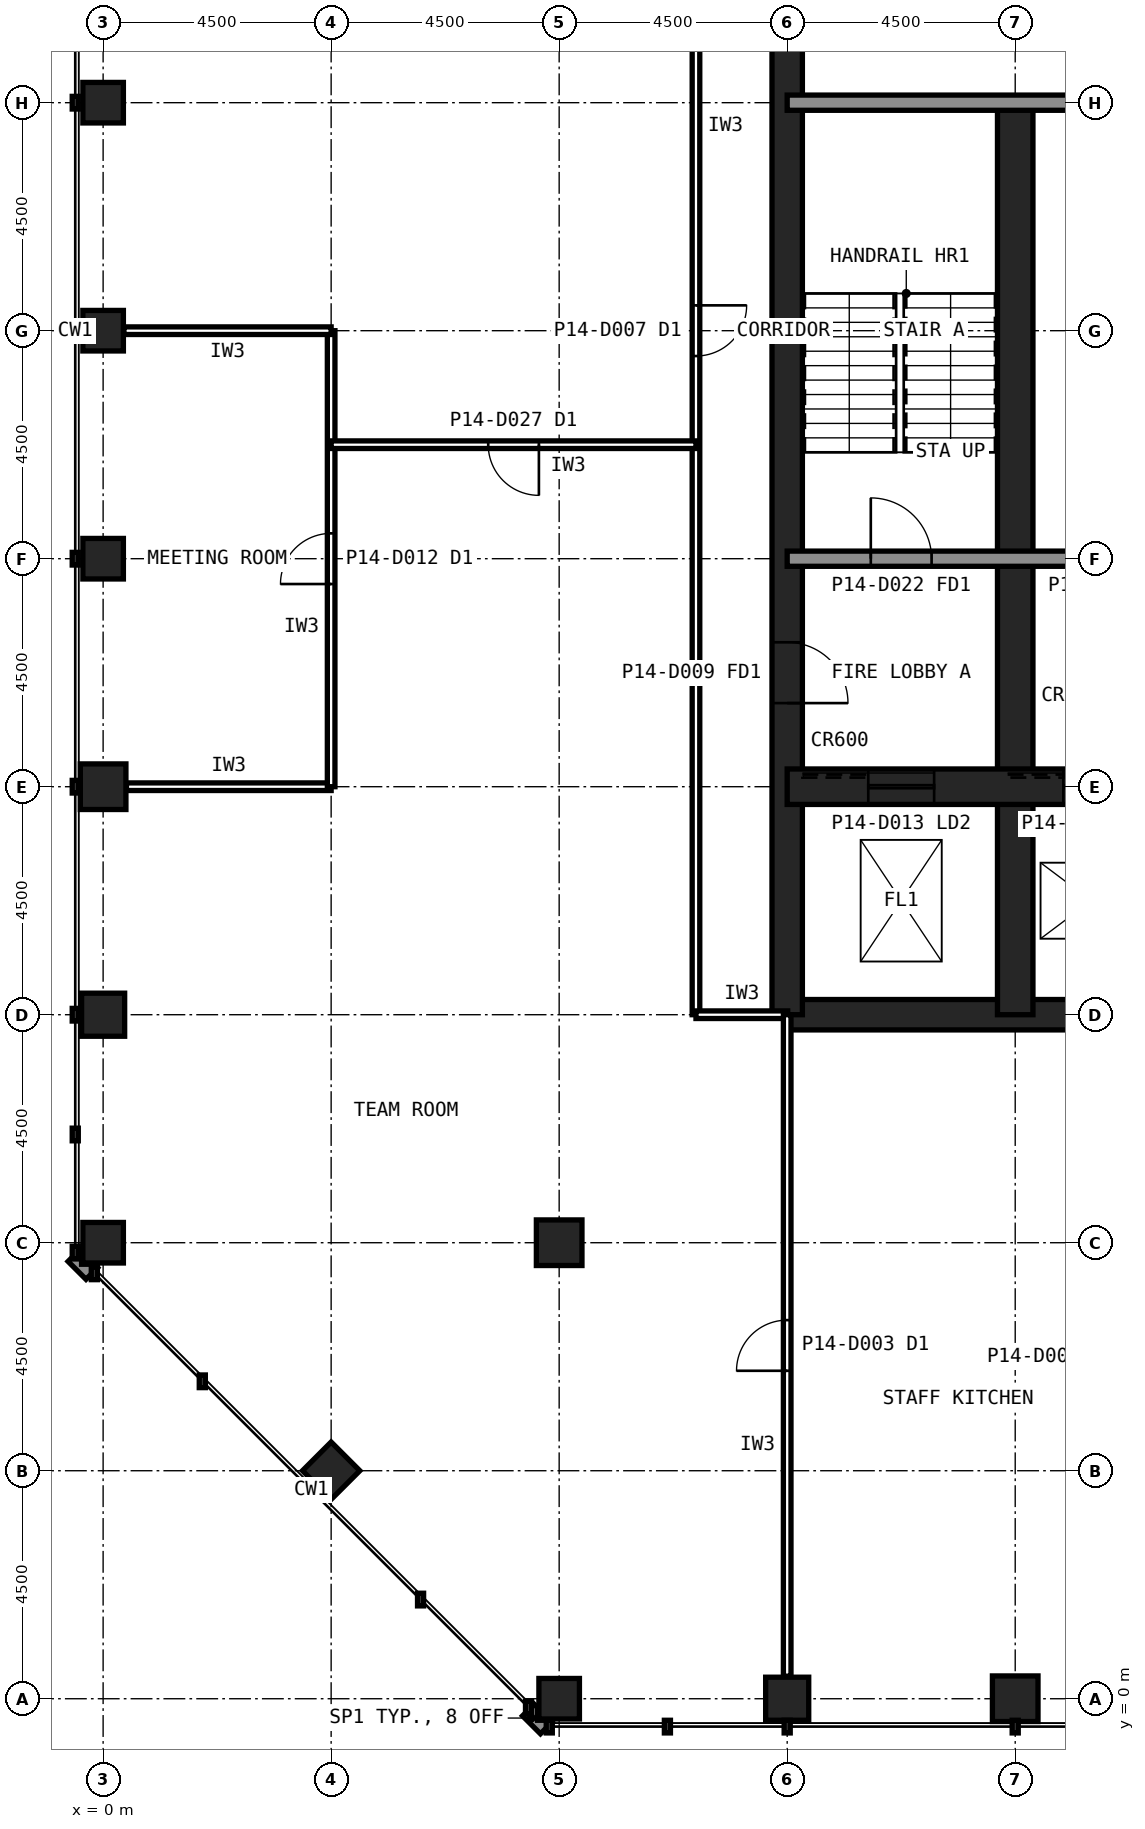
"""IFC4 building model, lengths in metres.
Left out: names, types, materials, properties, quantities, classifications, styles, units other than length and angle.
Written with IfcOpenShell. Run it as: python <this file> out.ifc"""

import sys

from ifc_helpers import new_model, si_unit, direction, frame, frame_2d, origin, origin_2d, place, context, subcontext, project, spatial, rectangle, hollow_rectangle, extrude, element, fill, save


model = new_model("IFC4")
c1 = context("Model", 3, precision=1e-05, world=origin(), true_north=direction((0.0, 1.0)))
c2 = subcontext(c1, "Body", "Model", "MODEL_VIEW")
j1 = project(units=[si_unit("LENGTHUNIT", "METRE"), si_unit("PLANEANGLEUNIT", "RADIAN")], contexts=[c1])
p1 = place(None, origin())
s1 = spatial("IfcSite", under=j1, at=p1, CompositionType="ELEMENT")
p2 = place(p1, origin())
s2 = spatial("IfcBuilding", under=s1, at=p2, CompositionType="ELEMENT")
p3 = place(p2, frame((0.0, 0.0, 62.6)))
s3 = spatial("IfcBuildingStorey", under=s2, at=p3, CompositionType="ELEMENT", Elevation=62.6)
p4 = place(p3, frame((9.0, 0.0, 0.0), z_axis=(0.0, 0.0, 1.0), x_axis=(1.0, 0.0, 0.0)))
e1 = element("IfcColumn", 1, at=p4, inside=s3, PredefinedType="COLUMN", context=c2, shape_type="SweptSolid", body=[
    extrude(hollow_rectangle(XDim=0.8, YDim=0.8, WallThickness=0.045, at=origin_2d()), origin(), (0.0, 0.0, 1.0), 4.2),
])
p5 = place(p3, frame((13.5, 0.0, 0.0), z_axis=(0.0, 0.0, 1.0), x_axis=(1.0, 0.0, 0.0)))
e2 = element("IfcColumn", 2, at=p5, inside=s3, PredefinedType="COLUMN", context=c2, shape_type="SweptSolid", body=[
    extrude(hollow_rectangle(XDim=0.85, YDim=0.85, WallThickness=0.05, at=origin_2d()), origin(), (0.0, 0.0, 1.0), 4.2),
])
p6 = place(p3, frame((18.0, 0.0, 0.0), z_axis=(0.0, 0.0, 1.0), x_axis=(1.0, 0.0, 0.0)))
e3 = element("IfcColumn", 3, at=p6, inside=s3, PredefinedType="COLUMN", context=c2, shape_type="SweptSolid", body=[
    extrude(hollow_rectangle(XDim=0.9, YDim=0.9, WallThickness=0.063, at=origin_2d()), origin(), (0.0, 0.0, 1.0), 4.2),
])
for number, where, z_axis, x_axis in (
    (4, (0.0, 31.5, 0.0), (0.0, 0.0, 1.0), (1.0, 0.0, 0.0)),
    (5, (0.0, 27.0, 0.0), (0.0, 0.0, 1.0), (1.0, 0.0, 0.0)),
    (6, (0.0, 22.5, 0.0), (0.0, 0.0, 1.0), (1.0, 0.0, 0.0)),
):
    element("IfcColumn", number, at=place(p3, frame(where, z_axis=z_axis, x_axis=x_axis)), inside=s3, PredefinedType="COLUMN", context=c2, shape_type="SweptSolid", body=[
        extrude(hollow_rectangle(XDim=0.8, YDim=0.8, WallThickness=0.045, at=origin_2d()), origin(), (0.0, 0.0, 1.0), 4.2),
    ])
p7 = place(p3, frame((0.0, 18.0, 0.0), z_axis=(0.0, 0.0, 1.0), x_axis=(1.0, 0.0, 0.0)))
e7 = element("IfcColumn", 7, at=p7, inside=s3, PredefinedType="COLUMN", context=c2, shape_type="SweptSolid", body=[
    extrude(hollow_rectangle(XDim=0.9, YDim=0.9, WallThickness=0.063, at=origin_2d()), origin(), (0.0, 0.0, 1.0), 4.2),
])
p8 = place(p3, frame((0.0, 13.5, 0.0), z_axis=(0.0, 0.0, 1.0), x_axis=(1.0, 0.0, 0.0)))
e8 = element("IfcColumn", 8, at=p8, inside=s3, PredefinedType="COLUMN", context=c2, shape_type="SweptSolid", body=[
    extrude(hollow_rectangle(XDim=0.85, YDim=0.85, WallThickness=0.05, at=origin_2d()), origin(), (0.0, 0.0, 1.0), 4.2),
])
for number, where, z_axis, x_axis in (
    (9, (0.0, 9.0, 0.0), (0.0, 0.0, 1.0), (1.0, 0.0, 0.0)),
    (10, (4.5, 4.5, 0.0), (0.0, 0.0, 1.0), (0.707, 0.707, 0.0)),
):
    element("IfcColumn", number, at=place(p3, frame(where, z_axis=z_axis, x_axis=x_axis)), inside=s3, PredefinedType="COLUMN", context=c2, shape_type="SweptSolid", body=[
        extrude(hollow_rectangle(XDim=0.8, YDim=0.8, WallThickness=0.045, at=origin_2d()), origin(), (0.0, 0.0, 1.0), 4.2),
    ])
p9 = place(p3, frame((9.0, 9.0, 0.0), z_axis=(0.0, 0.0, 1.0), x_axis=(1.0, 0.0, 0.0)))
e11 = element("IfcColumn", 11, at=p9, inside=s3, PredefinedType="COLUMN", context=c2, shape_type="SweptSolid", body=[
    extrude(hollow_rectangle(XDim=0.9, YDim=0.9, WallThickness=0.063, at=origin_2d()), origin(), (0.0, 0.0, 1.0), 4.2),
])
p10 = place(p3, frame((13.5, 13.5, 0.0), z_axis=(0.0, 0.0, 1.0), x_axis=(1.0, 0.0, 0.0)))
e12 = element("IfcWall", 12, at=p10, inside=s3, PredefinedType="SHEAR", context=c2, shape_type="SweptSolid", body=[
    extrude(rectangle(XDim=27.0, YDim=0.6, at=frame_2d((13.5, 0.0))), origin(), (0.0, 0.0, 1.0), 4.2),
])
p11 = place(p3, frame((13.5, 40.5, 0.0), z_axis=(0.0, 0.0, 1.0), x_axis=(0.0, -1.0, 0.0)))
e13 = element("IfcWall", 13, at=p11, inside=s3, PredefinedType="SHEAR", context=c2, shape_type="SweptSolid", body=[
    extrude(rectangle(XDim=27.0, YDim=0.6, at=frame_2d((13.5, 0.0))), origin(), (0.0, 0.0, 1.0), 4.2),
])
p12 = place(p11, frame((19.65, 0.0, 0.0)))
e14 = element("IfcOpeningElement", 14, at=p12, cuts=e13, PredefinedType="OPENING", context=c2, shape_type="SweptSolid", body=[
    extrude(rectangle(XDim=1.2, YDim=2.1, at=frame_2d((0.6, 1.05))), frame((0.0, 0.31, 0.0), z_axis=(0.0, -1.0, 0.0), x_axis=(1.0, 0.0, 0.0)), (0.0, 0.0, 1.0), 0.62),
])
p13 = place(p11, frame((5.85, 0.0, 0.0)))
e15 = element("IfcOpeningElement", 15, at=p13, cuts=e13, PredefinedType="OPENING", context=c2, shape_type="SweptSolid", body=[
    extrude(rectangle(XDim=1.8, YDim=2.1, at=frame_2d((0.9, 1.05))), frame((0.0, 0.31, 0.0), z_axis=(0.0, -1.0, 0.0), x_axis=(1.0, 0.0, 0.0)), (0.0, 0.0, 1.0), 0.62),
])
p14 = place(p3, frame((18.0, 13.5, 0.0), z_axis=(0.0, 0.0, 1.0), x_axis=(0.0, 1.0, 0.0)))
e16 = element("IfcWall", 16, at=p14, inside=s3, PredefinedType="SHEAR", context=c2, shape_type="SweptSolid", body=[
    extrude(rectangle(XDim=18.0, YDim=0.7, at=frame_2d((9.0, 0.0))), origin(), (0.0, 0.0, 1.0), 4.2),
])
p15 = place(p3, frame((13.5, 18.0, 0.0), z_axis=(0.0, 0.0, 1.0), x_axis=(1.0, 0.0, 0.0)))
e17 = element("IfcWall", 17, at=p15, inside=s3, PredefinedType="SHEAR", context=c2, shape_type="SweptSolid", body=[
    extrude(rectangle(XDim=27.0, YDim=0.7, at=frame_2d((13.5, 0.0))), origin(), (0.0, 0.0, 1.0), 4.2),
])
p16 = place(p15, frame((24.3, 0.0, 0.0)))
e18 = element("IfcOpeningElement", 18, at=p16, cuts=e17, PredefinedType="OPENING", context=c2, shape_type="SweptSolid", body=[
    extrude(rectangle(XDim=0.9, YDim=2.1, at=frame_2d((0.45, 1.05))), frame((0.0, 0.36, 0.0), z_axis=(0.0, -1.0, 0.0), x_axis=(1.0, 0.0, 0.0)), (0.0, 0.0, 1.0), 0.72),
])
p17 = place(p15, frame((5.45, 0.0, 0.0)))
e19 = element("IfcOpeningElement", 19, at=p17, cuts=e17, PredefinedType="OPENING", context=c2, shape_type="SweptSolid", body=[
    extrude(rectangle(XDim=1.1, YDim=2.1, at=frame_2d((0.55, 1.05))), frame((0.0, 0.36, 0.0), z_axis=(0.0, -1.0, 0.0), x_axis=(1.0, 0.0, 0.0)), (0.0, 0.0, 1.0), 0.72),
])
p18 = place(p15, frame((8.45, 0.0, 0.0)))
e20 = element("IfcOpeningElement", 20, at=p18, cuts=e17, PredefinedType="OPENING", context=c2, shape_type="SweptSolid", body=[
    extrude(rectangle(XDim=1.1, YDim=2.1, at=frame_2d((0.55, 1.05))), frame((0.0, 0.36, 0.0), z_axis=(0.0, -1.0, 0.0), x_axis=(1.0, 0.0, 0.0)), (0.0, 0.0, 1.0), 0.72),
])
p19 = place(p15, frame((11.45, 0.0, 0.0)))
e21 = element("IfcOpeningElement", 21, at=p19, cuts=e17, PredefinedType="OPENING", context=c2, shape_type="SweptSolid", body=[
    extrude(rectangle(XDim=1.1, YDim=2.1, at=frame_2d((0.55, 1.05))), frame((0.0, 0.36, 0.0), z_axis=(0.0, -1.0, 0.0), x_axis=(1.0, 0.0, 0.0)), (0.0, 0.0, 1.0), 0.72),
])
p20 = place(p15, frame((14.45, 0.0, 0.0)))
e22 = element("IfcOpeningElement", 22, at=p20, cuts=e17, PredefinedType="OPENING", context=c2, shape_type="SweptSolid", body=[
    extrude(rectangle(XDim=1.1, YDim=2.1, at=frame_2d((0.55, 1.05))), frame((0.0, 0.36, 0.0), z_axis=(0.0, -1.0, 0.0), x_axis=(1.0, 0.0, 0.0)), (0.0, 0.0, 1.0), 0.72),
])
p21 = place(p15, frame((17.45, 0.0, 0.0)))
e23 = element("IfcOpeningElement", 23, at=p21, cuts=e17, PredefinedType="OPENING", context=c2, shape_type="SweptSolid", body=[
    extrude(rectangle(XDim=1.1, YDim=2.1, at=frame_2d((0.55, 1.05))), frame((0.0, 0.36, 0.0), z_axis=(0.0, -1.0, 0.0), x_axis=(1.0, 0.0, 0.0)), (0.0, 0.0, 1.0), 0.72),
])
p22 = place(p15, frame((20.45, 0.0, 0.0)))
e24 = element("IfcOpeningElement", 24, at=p22, cuts=e17, PredefinedType="OPENING", context=c2, shape_type="SweptSolid", body=[
    extrude(rectangle(XDim=1.1, YDim=2.1, at=frame_2d((0.55, 1.05))), frame((0.0, 0.36, 0.0), z_axis=(0.0, -1.0, 0.0), x_axis=(1.0, 0.0, 0.0)), (0.0, 0.0, 1.0), 0.72),
])
p23 = place(p15, frame((1.6, 0.0, 0.0)))
e25 = element("IfcOpeningElement", 25, at=p23, cuts=e17, PredefinedType="OPENING", context=c2, shape_type="SweptSolid", body=[
    extrude(rectangle(XDim=1.3, YDim=2.2, at=frame_2d((0.65, 1.1))), frame((0.0, 0.36, 0.0), z_axis=(0.0, -1.0, 0.0), x_axis=(1.0, 0.0, 0.0)), (0.0, 0.0, 1.0), 0.72),
])
p24 = place(p3, frame((13.5, 22.5, 0.0), z_axis=(0.0, 0.0, 1.0), x_axis=(1.0, 0.0, 0.0)))
e26 = element("IfcWall", 26, at=p24, inside=s3, PredefinedType="SOLIDWALL", context=c2, shape_type="SweptSolid", body=[
    extrude(rectangle(XDim=27.0, YDim=0.3, at=frame_2d((13.5, 0.0))), origin(), (0.0, 0.0, 1.0), 4.04),
])
p25 = place(p24, frame((1.65, 0.0, 0.0)))
e27 = element("IfcOpeningElement", 27, at=p25, cuts=e26, PredefinedType="OPENING", context=c2, shape_type="SweptSolid", body=[
    extrude(rectangle(XDim=1.2, YDim=2.1, at=frame_2d((0.6, 1.05))), frame((0.0, 0.16, 0.0), z_axis=(0.0, -1.0, 0.0), x_axis=(1.0, 0.0, 0.0)), (0.0, 0.0, 1.0), 0.32),
])
p26 = place(p24, frame((6.025, 0.0, 0.0)))
e28 = element("IfcOpeningElement", 28, at=p26, cuts=e26, PredefinedType="OPENING", context=c2, shape_type="SweptSolid", body=[
    extrude(rectangle(XDim=1.0, YDim=2.1, at=frame_2d((0.5, 1.05))), frame((0.0, 0.16, 0.0), z_axis=(0.0, -1.0, 0.0), x_axis=(1.0, 0.0, 0.0)), (0.0, 0.0, 1.0), 0.32),
])
p27 = place(p24, frame((10.525, 0.0, 0.0)))
e29 = element("IfcOpeningElement", 29, at=p27, cuts=e26, PredefinedType="OPENING", context=c2, shape_type="SweptSolid", body=[
    extrude(rectangle(XDim=1.0, YDim=2.1, at=frame_2d((0.5, 1.05))), frame((0.0, 0.16, 0.0), z_axis=(0.0, -1.0, 0.0), x_axis=(1.0, 0.0, 0.0)), (0.0, 0.0, 1.0), 0.32),
])
p28 = place(p24, frame((19.75, 0.0, 0.0)))
e30 = element("IfcOpeningElement", 30, at=p28, cuts=e26, PredefinedType="OPENING", context=c2, shape_type="SweptSolid", body=[
    extrude(rectangle(XDim=1.0, YDim=2.1, at=frame_2d((0.5, 1.05))), frame((0.0, 0.16, 0.0), z_axis=(0.0, -1.0, 0.0), x_axis=(1.0, 0.0, 0.0)), (0.0, 0.0, 1.0), 0.32),
])
p29 = place(p24, frame((15.05, 0.0, 0.0)))
e31 = element("IfcOpeningElement", 31, at=p29, cuts=e26, PredefinedType="OPENING", context=c2, shape_type="SweptSolid", body=[
    extrude(rectangle(XDim=1.4, YDim=2.4, at=frame_2d((0.7, 1.2))), frame((0.0, 0.16, 0.0), z_axis=(0.0, -1.0, 0.0), x_axis=(1.0, 0.0, 0.0)), (0.0, 0.0, 1.0), 0.32),
])
p30 = place(p3, frame((13.5, 31.5, 0.0), z_axis=(0.0, 0.0, 1.0), x_axis=(1.0, 0.0, 0.0)))
e32 = element("IfcWall", 32, at=p30, inside=s3, PredefinedType="SOLIDWALL", context=c2, shape_type="SweptSolid", body=[
    extrude(rectangle(XDim=27.0, YDim=0.3, at=frame_2d((13.5, 0.0))), origin(), (0.0, 0.0, 1.0), 4.04),
])
p31 = place(p30, frame((24.15, 0.0, 0.0)))
e33 = element("IfcOpeningElement", 33, at=p31, cuts=e32, PredefinedType="OPENING", context=c2, shape_type="SweptSolid", body=[
    extrude(rectangle(XDim=1.2, YDim=2.1, at=frame_2d((0.6, 1.05))), frame((0.0, 0.16, 0.0), z_axis=(0.0, -1.0, 0.0), x_axis=(1.0, 0.0, 0.0)), (0.0, 0.0, 1.0), 0.32),
])
p32 = place(p30, frame((15.3, 0.0, 0.0)))
e34 = element("IfcOpeningElement", 34, at=p32, cuts=e32, PredefinedType="OPENING", context=c2, shape_type="SweptSolid", body=[
    extrude(rectangle(XDim=0.9, YDim=2.1, at=frame_2d((0.45, 1.05))), frame((0.0, 0.16, 0.0), z_axis=(0.0, -1.0, 0.0), x_axis=(1.0, 0.0, 0.0)), (0.0, 0.0, 1.0), 0.32),
])
p33 = place(p30, frame((19.8, 0.0, 0.0)))
e35 = element("IfcOpeningElement", 35, at=p33, cuts=e32, PredefinedType="OPENING", context=c2, shape_type="SweptSolid", body=[
    extrude(rectangle(XDim=0.9, YDim=2.1, at=frame_2d((0.45, 1.05))), frame((0.0, 0.16, 0.0), z_axis=(0.0, -1.0, 0.0), x_axis=(1.0, 0.0, 0.0)), (0.0, 0.0, 1.0), 0.32),
])
p34 = place(p3, frame((11.7, 40.5, 0.0), z_axis=(0.0, 0.0, 1.0), x_axis=(0.0, -1.0, 0.0)))
e36 = element("IfcWall", 36, at=p34, inside=s3, PredefinedType="PARTITIONING", context=c2, shape_type="SweptSolid", body=[
    extrude(rectangle(XDim=27.0, YDim=0.15, at=frame_2d((13.5, 0.0))), origin(), (0.0, 0.0, 1.0), 4.04),
])
p35 = place(p34, frame((13.0, 0.0, 0.0)))
e37 = element("IfcOpeningElement", 37, at=p35, cuts=e36, PredefinedType="OPENING", context=c2, shape_type="SweptSolid", body=[
    extrude(rectangle(XDim=1.0, YDim=2.1, at=frame_2d((0.5, 1.05))), frame((0.0, 0.085, 0.0), z_axis=(0.0, -1.0, 0.0), x_axis=(1.0, 0.0, 0.0)), (0.0, 0.0, 1.0), 0.17),
])
p36 = place(p3, frame((11.7, 13.5, 0.0), z_axis=(0.0, 0.0, 1.0), x_axis=(1.0, 0.0, 0.0)))
e38 = element("IfcWall", 38, at=p36, inside=s3, PredefinedType="PARTITIONING", context=c2, shape_type="SweptSolid", body=[
    extrude(rectangle(XDim=1.81, YDim=0.15, at=frame_2d((0.905, 0.0))), origin(), (0.0, 0.0, 1.0), 3.189),
])
p37 = place(p3, frame((0.46, 18.0, 0.0), z_axis=(0.0, 0.0, 1.0), x_axis=(1.0, 0.0, 0.0)))
e39 = element("IfcWall", 39, at=p37, inside=s3, PredefinedType="PARTITIONING", context=c2, shape_type="SweptSolid", body=[
    extrude(rectangle(XDim=4.04, YDim=0.15, at=frame_2d((2.02, 0.0))), origin(), (0.0, 0.0, 1.0), 3.189),
])
p38 = place(p3, frame((4.5, 18.0, 0.0), z_axis=(0.0, 0.0, 1.0), x_axis=(0.0, 1.0, 0.0)))
e40 = element("IfcWall", 40, at=p38, inside=s3, PredefinedType="PARTITIONING", context=c2, shape_type="SweptSolid", body=[
    extrude(rectangle(XDim=9.0, YDim=0.15, at=frame_2d((4.5, 0.0))), origin(), (0.0, 0.0, 1.0), 4.04),
])
p39 = place(p38, frame((4.0, 0.0, 0.0)))
e41 = element("IfcOpeningElement", 41, at=p39, cuts=e40, PredefinedType="OPENING", context=c2, shape_type="SweptSolid", body=[
    extrude(rectangle(XDim=1.0, YDim=2.1, at=frame_2d((0.5, 1.05))), frame((0.0, 0.085, 0.0), z_axis=(0.0, -1.0, 0.0), x_axis=(1.0, 0.0, 0.0)), (0.0, 0.0, 1.0), 0.17),
])
p40 = place(p3, frame((4.5, 27.0, 0.0), z_axis=(0.0, 0.0, 1.0), x_axis=(-1.0, 0.0, 0.0)))
e42 = element("IfcWall", 42, at=p40, inside=s3, PredefinedType="PARTITIONING", context=c2, shape_type="SweptSolid", body=[
    extrude(rectangle(XDim=4.09, YDim=0.15, at=frame_2d((2.045, 0.0))), origin(), (0.0, 0.0, 1.0), 3.189),
])
p41 = place(p3, frame((11.7, 24.75, 0.0), z_axis=(0.0, 0.0, 1.0), x_axis=(-1.0, 0.0, 0.0)))
e43 = element("IfcWall", 43, at=p41, inside=s3, PredefinedType="PARTITIONING", context=c2, shape_type="SweptSolid", body=[
    extrude(rectangle(XDim=7.2, YDim=0.15, at=frame_2d((3.6, 0.0))), origin(), (0.0, 0.0, 1.0), 4.04),
])
p42 = place(p41, frame((3.1, 0.0, 0.0)))
e44 = element("IfcOpeningElement", 44, at=p42, cuts=e43, PredefinedType="OPENING", context=c2, shape_type="SweptSolid", body=[
    extrude(rectangle(XDim=1.0, YDim=2.1, at=frame_2d((0.5, 1.05))), frame((0.0, 0.085, 0.0), z_axis=(0.0, -1.0, 0.0), x_axis=(1.0, 0.0, 0.0)), (0.0, 0.0, 1.0), 0.17),
])
p43 = place(p3, frame((13.5, 0.445, 0.0), z_axis=(0.0, 0.0, 1.0), x_axis=(0.0, 1.0, 0.0)))
e45 = element("IfcWall", 45, at=p43, inside=s3, PredefinedType="PARTITIONING", context=c2, shape_type="SweptSolid", body=[
    extrude(rectangle(XDim=13.055, YDim=0.15, at=frame_2d((6.527, 0.0))), origin(), (0.0, 0.0, 1.0), 3.189),
])
p44 = place(p43, frame((6.028, 0.0, 0.0)))
e46 = element("IfcOpeningElement", 46, at=p44, cuts=e45, PredefinedType="OPENING", context=c2, shape_type="SweptSolid", body=[
    extrude(rectangle(XDim=1.0, YDim=2.1, at=frame_2d((0.5, 1.05))), frame((0.0, 0.085, 0.0), z_axis=(0.0, -1.0, 0.0), x_axis=(1.0, 0.0, 0.0)), (0.0, 0.0, 1.0), 0.17),
])
p45 = place(p12, origin())
e47 = element("IfcDoor", 47, at=p45, inside=s3, OperationType="SINGLE_SWING_RIGHT", PredefinedType="DOOR", context=c2, shape_type="SweptSolid", body=[
    extrude(rectangle(XDim=1.2, YDim=2.1, at=frame_2d((0.6, 1.05))), frame((0.0, 0.025, 0.0), z_axis=(0.0, -1.0, 0.0), x_axis=(1.0, 0.0, 0.0)), (0.0, 0.0, 1.0), 0.05),
])
fill(e14, e47)
p46 = place(p25, origin())
e48 = element("IfcDoor", 48, at=p46, inside=s3, OperationType="SINGLE_SWING_LEFT", PredefinedType="DOOR", context=c2, shape_type="SweptSolid", body=[
    extrude(rectangle(XDim=1.2, YDim=2.1, at=frame_2d((0.6, 1.05))), frame((0.0, 0.025, 0.0), z_axis=(0.0, -1.0, 0.0), x_axis=(1.0, 0.0, 0.0)), (0.0, 0.0, 1.0), 0.05),
])
fill(e27, e48)
p47 = place(p17, origin())
e49 = element("IfcDoor", 49, at=p47, inside=s3, OperationType="SLIDING_TO_LEFT", PredefinedType="DOOR", context=c2, shape_type="SweptSolid", body=[
    extrude(rectangle(XDim=1.1, YDim=2.1, at=frame_2d((0.55, 1.05))), frame((0.0, 0.025, 0.0), z_axis=(0.0, -1.0, 0.0), x_axis=(1.0, 0.0, 0.0)), (0.0, 0.0, 1.0), 0.05),
])
fill(e19, e49)
p48 = place(p23, origin())
e50 = element("IfcDoor", 50, at=p48, inside=s3, OperationType="SLIDING_TO_LEFT", PredefinedType="DOOR", context=c2, shape_type="SweptSolid", body=[
    extrude(rectangle(XDim=1.3, YDim=2.2, at=frame_2d((0.65, 1.1))), frame((0.0, 0.025, 0.0), z_axis=(0.0, -1.0, 0.0), x_axis=(1.0, 0.0, 0.0)), (0.0, 0.0, 1.0), 0.05),
])
fill(e25, e50)
p49 = place(p35, origin())
e51 = element("IfcDoor", 51, at=p49, inside=s3, OperationType="SINGLE_SWING_LEFT", PredefinedType="DOOR", context=c2, shape_type="SweptSolid", body=[
    extrude(rectangle(XDim=1.0, YDim=2.1, at=frame_2d((0.5, 1.05))), frame((0.0, 0.025, 0.0), z_axis=(0.0, -1.0, 0.0), x_axis=(1.0, 0.0, 0.0)), (0.0, 0.0, 1.0), 0.05),
])
fill(e37, e51)
p50 = place(p39, origin())
e52 = element("IfcDoor", 52, at=p50, inside=s3, OperationType="SINGLE_SWING_LEFT", PredefinedType="DOOR", context=c2, shape_type="SweptSolid", body=[
    extrude(rectangle(XDim=1.0, YDim=2.1, at=frame_2d((0.5, 1.05))), frame((0.0, 0.025, 0.0), z_axis=(0.0, -1.0, 0.0), x_axis=(1.0, 0.0, 0.0)), (0.0, 0.0, 1.0), 0.05),
])
fill(e41, e52)
p51 = place(p42, origin())
e53 = element("IfcDoor", 53, at=p51, inside=s3, OperationType="SINGLE_SWING_LEFT", PredefinedType="DOOR", context=c2, shape_type="SweptSolid", body=[
    extrude(rectangle(XDim=1.0, YDim=2.1, at=frame_2d((0.5, 1.05))), frame((0.0, 0.025, 0.0), z_axis=(0.0, -1.0, 0.0), x_axis=(1.0, 0.0, 0.0)), (0.0, 0.0, 1.0), 0.05),
])
fill(e44, e53)
p52 = place(p44, origin())
e54 = element("IfcDoor", 54, at=p52, inside=s3, OperationType="SINGLE_SWING_LEFT", PredefinedType="DOOR", context=c2, shape_type="SweptSolid", body=[
    extrude(rectangle(XDim=1.0, YDim=2.1, at=frame_2d((0.5, 1.05))), frame((0.0, 0.025, 0.0), z_axis=(0.0, -1.0, 0.0), x_axis=(1.0, 0.0, 0.0)), (0.0, 0.0, 1.0), 0.05),
])
fill(e46, e54)
save(model, sys.argv[1])
